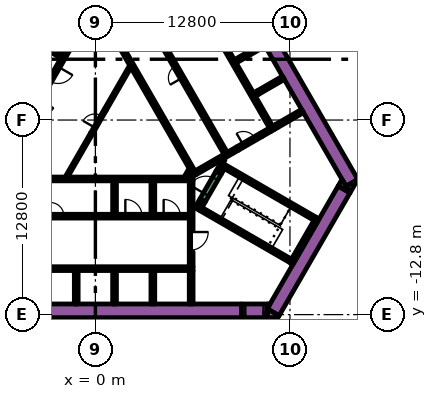
"""IFC4 building model, lengths in metres.
Left out: names, types, materials, properties, quantities, classifications, styles, units other than length and angle.
Written with IfcOpenShell. Run it as: python <this file> out.ifc"""

import sys

from ifc_helpers import new_model, si_unit, direction, frame, frame_2d, origin, place, context, subcontext, project, spatial, polyline, rectangle, outline, extrude, element, fill, save


model = new_model("IFC4")
c1 = context("Model", 3, precision=1e-05, world=origin(), true_north=direction((0.0, 1.0)))
c2 = subcontext(c1, "Body", "Model", "MODEL_VIEW")
j1 = project(units=[si_unit("LENGTHUNIT", "METRE"), si_unit("PLANEANGLEUNIT", "RADIAN")], contexts=[c1])
p1 = place(None, origin())
s1 = spatial("IfcSite", under=j1, at=p1, CompositionType="ELEMENT")
p2 = place(p1, origin())
s2 = spatial("IfcBuilding", under=s1, at=p2, CompositionType="ELEMENT")
p3 = place(p2, frame((0.0, 0.0, 11.4)))
s3 = spatial("IfcBuildingStorey", under=s2, at=p3, CompositionType="ELEMENT", Elevation=11.4)
p4 = place(p3, frame((6.776, 13.364, 0.0), z_axis=(0.0, 0.0, 1.0), x_axis=(0.500004177138, -0.8660229921, 0.0)))
e1 = element("IfcWall", 1, at=p4, inside=s3, PredefinedType="SOLIDWALL", context=c2, shape_type="SweptSolid", body=[
    extrude(rectangle(XDim=20.204, YDim=0.9, at=frame_2d((10.102, 0.0))), origin(), (0.0, 0.0, 1.0), 4.8),
])
p5 = place(p3, origin())
e2 = element("IfcWall", 2, at=p5, inside=s3, PredefinedType="SOLIDWALL", context=c2, shape_type="SweptSolid", body=[
    extrude(outline(polyline([(16.743, -4.8), (16.489, -4.36), (17.251, -3.92), (16.743, -4.8)])), origin(), (0.0, 0.0, 1.0), 4.8),
])
p6 = place(p3, frame((11.695, -12.644, 0.0), z_axis=(0.0, 0.0, 1.0), x_axis=(0.500010229568, 0.86601949766, 0.0)))
e3 = element("IfcWall", 3, at=p6, inside=s3, PredefinedType="SOLIDWALL", context=c2, shape_type="SweptSolid", body=[
    extrude(rectangle(XDim=9.326, YDim=0.9, at=frame_2d((4.663, 0.0))), origin(), (0.0, 0.0, 1.0), 4.8),
])
e4 = element("IfcWall", 4, at=p5, inside=s3, PredefinedType="SOLIDWALL", context=c2, shape_type="SweptSolid", body=[
    extrude(outline(polyline([(12.009, -13.0), (11.312, -13.0), (11.312, -12.425), (12.083, -12.871), (12.009, -13.0)])), origin(), (0.0, 0.0, 1.0), 4.8),
])
e5 = element("IfcWall", 5, at=p5, inside=s3, PredefinedType="SOLIDWALL", context=c2, shape_type="SweptSolid", body=[
    extrude(outline(polyline([(16.223, -3.9), (16.732, -4.78), (15.969, -4.34), (16.223, -3.9)])), origin(), (0.0, 0.0, 1.0), 4.8),
])
e6 = element("IfcWall", 6, at=p5, inside=s3, PredefinedType="SOLIDWALL", context=c2, shape_type="SweptSolid", body=[
    extrude(outline(polyline([(11.489, -12.1), (11.312, -12.407), (11.312, -12.1), (11.489, -12.1)])), origin(), (0.0, 0.0, 1.0), 4.8),
])
p7 = place(p3, frame((-12.019, -12.55, 0.0), z_axis=(0.0, 0.0, 1.0), x_axis=(1.0, 0.0, 0.0)))
e7 = element("IfcWall", 7, at=p7, inside=s3, PredefinedType="SOLIDWALL", context=c2, shape_type="SweptSolid", body=[
    extrude(rectangle(XDim=21.63, YDim=0.9, at=frame_2d((10.815, 0.0))), origin(), (0.0, 0.0, 1.0), 4.8),
])
p8 = place(p3, frame((12.885, -9.431, 0.0), z_axis=(0.0, 0.0, 1.0), x_axis=(0.500020560727, 0.866013532718, 0.0)))
e8 = element("IfcWall", 8, at=p8, inside=s3, PredefinedType="SOLIDWALL", context=c2, shape_type="SweptSolid", body=[
    extrude(rectangle(XDim=3.45, YDim=0.25, at=frame_2d((1.725, 0.0))), origin(), (0.0, 0.0, 1.0), 4.8),
])
p9 = place(p3, frame((12.84, -9.261, 0.0), z_axis=(0.0, 0.0, 1.0), x_axis=(-0.866013990052, 0.500019768644, 0.0)))
e9 = element("IfcWall", 9, at=p9, inside=s3, PredefinedType="SOLIDWALL", context=c2, shape_type="SweptSolid", body=[
    extrude(rectangle(XDim=6.8, YDim=0.25, at=frame_2d((3.4, 0.0))), origin(), (0.0, 0.0, 1.0), 4.8),
])
p10 = place(p3, frame((6.78, -5.906, 0.0), z_axis=(0.0, 0.0, 1.0), x_axis=(0.500223362819, 0.865896406789, 0.0)))
e10 = element("IfcWall", 10, at=p10, inside=s3, PredefinedType="SOLIDWALL", context=c2, shape_type="SweptSolid", body=[
    extrude(rectangle(XDim=0.675, YDim=0.25, at=frame_2d((0.337, 0.0))), origin(), (0.0, 0.0, 1.0), 4.8),
])
p11 = place(p3, frame((8.334, -2.964, 0.0), z_axis=(0.0, 0.0, 1.0), x_axis=(0.866016039709, -0.500016218704, 0.0)))
e11 = element("IfcWall", 11, at=p11, inside=s3, PredefinedType="SOLIDWALL", context=c2, shape_type="SweptSolid", body=[
    extrude(rectangle(XDim=7.05, YDim=0.25, at=frame_2d((3.525, 0.0))), origin(), (0.0, 0.0, 1.0), 4.8),
])
p12 = place(p3, frame((8.168, -3.503, 0.0), z_axis=(0.0, 0.0, 1.0), x_axis=(0.49972245349, 0.866185586049, 0.0)))
e12 = element("IfcWall", 12, at=p12, inside=s3, PredefinedType="SOLIDWALL", context=c2, shape_type="SweptSolid", body=[
    extrude(rectangle(XDim=0.425, YDim=0.25, at=frame_2d((0.212, 0.0))), origin(), (0.0, 0.0, 1.0), 4.8),
])
p13 = place(p3, frame((-6.425, -9.775, 0.0), z_axis=(0.0, 0.0, 1.0), x_axis=(1.0, 0.0, 0.0)))
e13 = element("IfcWall", 13, at=p13, inside=s3, PredefinedType="SOLIDWALL", context=c2, shape_type="SweptSolid", body=[
    extrude(rectangle(XDim=12.85, YDim=0.25, at=frame_2d((6.425, 0.0))), origin(), (0.0, 0.0, 1.0), 4.8),
])
p14 = place(p3, frame((-5.845, -3.875, 0.0), z_axis=(0.0, 0.0, 1.0), x_axis=(1.0, 0.0, 0.0)))
e14 = element("IfcWall", 14, at=p14, inside=s3, PredefinedType="SOLIDWALL", context=c2, shape_type="SweptSolid", body=[
    extrude(rectangle(XDim=12.27, YDim=0.25, at=frame_2d((6.135, 0.0))), origin(), (0.0, 0.0, 1.0), 4.8),
])
p15 = place(p3, frame((6.3, -7.27, 0.0), z_axis=(0.0, 0.0, 1.0), x_axis=(0.0, 1.0, 0.0)))
e15 = element("IfcWall", 15, at=p15, inside=s3, PredefinedType="SOLIDWALL", context=c2, shape_type="SweptSolid", body=[
    extrude(rectangle(XDim=3.27, YDim=0.25, at=frame_2d((1.635, 0.0))), origin(), (0.0, 0.0, 1.0), 4.8),
])
p16 = place(p3, frame((6.3, -8.672, 0.0), z_axis=(0.0, 0.0, 1.0), x_axis=(0.0, -1.0, 0.0)))
e16 = element("IfcWall", 16, at=p16, inside=s3, PredefinedType="SOLIDWALL", context=c2, shape_type="SweptSolid", body=[
    extrude(rectangle(XDim=0.978, YDim=0.25, at=frame_2d((0.489, 0.0))), origin(), (0.0, 0.0, 1.0), 4.8),
])
for number, where, z_axis, x_axis in (
    (17, (3.78, -4.0, 0.0), (0.0, 0.0, 1.0), (0.0, -1.0, 0.0)),
    (18, (1.26, -4.0, 0.0), (0.0, 0.0, 1.0), (0.0, -1.0, 0.0)),
):
    element("IfcWall", number, at=place(p3, frame(where, z_axis=z_axis, x_axis=x_axis)), inside=s3, PredefinedType="SOLIDWALL", context=c2, shape_type="SweptSolid", body=[
        extrude(rectangle(XDim=2.2, YDim=0.25, at=frame_2d((1.1, 0.0))), origin(), (0.0, 0.0, 1.0), 4.8),
    ])
for number, where, z_axis, x_axis in (
    (19, (6.3, -9.9, 0.0), (0.0, 0.0, 1.0), (0.0, -1.0, 0.0)),
    (20, (3.78, -9.9, 0.0), (0.0, 0.0, 1.0), (0.0, -1.0, 0.0)),
    (21, (1.26, -9.9, 0.0), (0.0, 0.0, 1.0), (0.0, -1.0, 0.0)),
    (22, (-1.26, -9.9, 0.0), (0.0, 0.0, 1.0), (0.0, -1.0, 0.0)),
):
    element("IfcWall", number, at=place(p3, frame(where, z_axis=z_axis, x_axis=x_axis)), inside=s3, PredefinedType="SOLIDWALL", context=c2, shape_type="SweptSolid", body=[
        extrude(rectangle(XDim=2.2, YDim=0.25, at=frame_2d((1.1, 0.0))), origin(), (0.0, 0.0, 1.0), 4.8),
    ])
p17 = place(p3, frame((11.678, -0.677, 0.0), z_axis=(0.0, 0.0, 1.0), x_axis=(-0.500003135297, 0.866023593612, 0.0)))
e23 = element("IfcWall", 23, at=p17, inside=s3, PredefinedType="SOLIDWALL", context=c2, shape_type="SweptSolid", body=[
    extrude(rectangle(XDim=12.85, YDim=0.25, at=frame_2d((6.425, 0.0))), origin(), (0.0, 0.0, 1.0), 4.8),
])
for number, where, z_axis, x_axis in (
    (24, (10.464, 1.677, 0.0), (0.0, 0.0, 1.0), (0.866, 0.5, 0.0)),
    (25, (11.894, -0.552, 0.0), (0.0, 0.0, 1.0), (-0.5, 0.866, 0.0)),
):
    element("IfcWall", number, at=place(p3, frame(where, z_axis=z_axis, x_axis=x_axis)), inside=s3, PredefinedType="SOLIDWALL", context=c2, shape_type="SweptSolid", body=[
        extrude(rectangle(XDim=0.25, YDim=0.25, at=frame_2d((0.125, 0.0))), origin(), (0.0, 0.0, 1.0), 4.8),
    ])
for number, where, z_axis, x_axis in (
    (26, (11.94, -0.381, 0.0), (0.0, 0.0, 1.0), (0.866, 0.5, 0.0)),
    (27, (12.369, 2.776, 0.0), (0.0, 0.0, 1.0), (-0.866, -0.5, 0.0)),
):
    element("IfcWall", number, at=place(p3, frame(where, z_axis=z_axis, x_axis=x_axis)), inside=s3, PredefinedType="SOLIDWALL", context=c2, shape_type="SweptSolid", body=[
        extrude(rectangle(XDim=1.95, YDim=0.25, at=frame_2d((0.975, 0.0))), origin(), (0.0, 0.0, 1.0), 4.8),
    ])
p18 = place(p3, frame((11.507, -0.631, 0.0), z_axis=(0.0, 0.0, 1.0), x_axis=(-0.866074517829, -0.49991492233, 0.0)))
e28 = element("IfcWall", 28, at=p18, inside=s3, PredefinedType="SOLIDWALL", context=c2, shape_type="SweptSolid", body=[
    extrude(rectangle(XDim=0.695, YDim=0.25, at=frame_2d((0.348, 0.0))), origin(), (0.0, 0.0, 1.0), 4.8),
])
e29 = element("IfcWall", 29, at=p5, inside=s3, PredefinedType="SOLIDWALL", context=c2, shape_type="SweptSolid", body=[
    extrude(outline(polyline([(6.552, -3.348), (6.677, -3.564), (6.46, -3.689), (4.897, -0.981), (0.332, 6.925), (0.335, 6.925), (0.335, 6.925), (0.335, 6.925), (0.335, 7.075), (0.335, 7.075), (0.335, 7.075), (0.245, 7.075), (0.079, 7.363), (0.035, 7.439), (0.252, 7.564), (0.377, 7.348), (6.552, -3.348)])), origin(), (0.0, 0.0, 1.0), 4.8),
])
p19 = place(p3, frame((6.614, -3.456, 0.0), z_axis=(0.0, 0.0, 1.0), x_axis=(0.86602447079, 0.500001615989, 0.0)))
e30 = element("IfcWall", 30, at=p19, inside=s3, PredefinedType="SOLIDWALL", context=c2, shape_type="SweptSolid", body=[
    extrude(rectangle(XDim=3.154, YDim=0.25, at=frame_2d((1.577, 0.0))), origin(), (0.0, 0.0, 1.0), 4.8),
])
p20 = place(p3, frame((9.204, 3.859, 0.0), z_axis=(0.0, 0.0, 1.0), x_axis=(0.86605622881, 0.499946605688, 0.0)))
e31 = element("IfcWall", 31, at=p20, inside=s3, PredefinedType="SOLIDWALL", context=c2, shape_type="SweptSolid", body=[
    extrude(rectangle(XDim=2.2, YDim=0.25, at=frame_2d((1.1, 0.0))), origin(), (0.0, 0.0, 1.0), 4.8),
])
p21 = place(p3, frame((-8.06, -1.311, 0.0), z_axis=(0.0, 0.0, 1.0), x_axis=(0.50000273126, 0.866023826885, 0.0)))
e32 = element("IfcWall", 32, at=p21, inside=s3, PredefinedType="SOLIDWALL", context=c2, shape_type="SweptSolid", body=[
    extrude(rectangle(XDim=10.33, YDim=0.25, at=frame_2d((5.165, 0.0))), origin(), (0.0, 0.0, 1.0), 4.8),
])
p22 = place(p3, frame((-2.204, 4.182, 0.0), z_axis=(0.0, 0.0, 1.0), x_axis=(-0.866008176907, 0.50002983664, 0.0)))
e33 = element("IfcWall", 33, at=p22, inside=s3, PredefinedType="SOLIDWALL", context=c2, shape_type="SweptSolid", body=[
    extrude(rectangle(XDim=2.2, YDim=0.25, at=frame_2d((1.1, 0.0))), origin(), (0.0, 0.0, 1.0), 4.8),
])
p23 = place(p3, frame((6.945, -5.222, 0.0), z_axis=(0.0, 0.0, 1.0), x_axis=(-0.499818422106, -0.866130212453, 0.0)))
e34 = element("IfcWall", 34, at=p23, inside=s3, PredefinedType="PARTITIONING", context=c2, shape_type="SweptSolid", body=[
    extrude(rectangle(XDim=0.514, YDim=0.15, at=frame_2d((0.257, 0.0))), origin(), (0.0, 0.0, 1.0), 3.9),
])
p24 = place(p3, frame((5.936, -3.718, 0.0), z_axis=(0.0, 0.0, 1.0), x_axis=(0.499890179513, 0.866088799389, 0.0)))
e35 = element("IfcWall", 35, at=p24, inside=s3, PredefinedType="PARTITIONING", context=c2, shape_type="SweptSolid", body=[
    extrude(rectangle(XDim=0.504, YDim=0.15, at=frame_2d((0.252, 0.0))), origin(), (0.0, 0.0, 1.0), 3.9),
])
p25 = place(p3, frame((8.459, -2.599, 0.0), z_axis=(0.0, 0.0, 1.0), x_axis=(-0.500041054325, -0.866001699761, 0.0)))
e36 = element("IfcWall", 36, at=p25, inside=s3, PredefinedType="PARTITIONING", context=c2, shape_type="SweptSolid", body=[
    extrude(rectangle(XDim=0.929, YDim=0.15, at=frame_2d((0.464, 0.0))), origin(), (0.0, 0.0, 1.0), 4.8),
])
for number, where, z_axis, x_axis in (
    (37, (-1.887, -3.718, 0.0), (0.0, 0.0, 1.0), (0.5, 0.866, 0.0)),
    (38, (0.645, 0.667, 0.0), (0.0, 0.0, 1.0), (0.5, 0.866, 0.0)),
):
    element("IfcWall", number, at=place(p3, frame(where, z_axis=z_axis, x_axis=x_axis)), inside=s3, PredefinedType="PARTITIONING", context=c2, shape_type="SweptSolid", body=[
        extrude(rectangle(XDim=3.263, YDim=0.15, at=frame_2d((1.632, 0.0))), origin(), (0.0, 0.0, 1.0), 3.9),
    ])
p26 = place(p3, frame((-6.175, -6.325, 0.0), z_axis=(0.0, 0.0, 1.0), x_axis=(1.0, 0.0, 0.0)))
e39 = element("IfcWall", 39, at=p26, inside=s3, PredefinedType="SOLIDWALL", context=c2, shape_type="SweptSolid", body=[
    extrude(rectangle(XDim=12.35, YDim=0.25, at=frame_2d((6.175, 0.0))), origin(), (0.0, 0.0, 1.0), 4.8),
])
p27 = place(p26, frame((3.205, 0.0, 0.0)))
e40 = element("IfcOpeningElement", 40, at=p27, cuts=e39, PredefinedType="OPENING", context=c2, shape_type="SweptSolid", body=[
    extrude(rectangle(XDim=0.9, YDim=2.1, at=frame_2d((0.45, 1.05))), frame((0.0, 0.135, 0.0), z_axis=(0.0, -1.0, 0.0), x_axis=(1.0, 0.0, 0.0)), (0.0, 0.0, 1.0), 0.27),
])
p28 = place(p26, frame((8.145, 0.0, 0.0)))
e41 = element("IfcOpeningElement", 41, at=p28, cuts=e39, PredefinedType="OPENING", context=c2, shape_type="SweptSolid", body=[
    extrude(rectangle(XDim=1.1, YDim=2.1, at=frame_2d((0.55, 1.05))), frame((0.0, 0.135, 0.0), z_axis=(0.0, -1.0, 0.0), x_axis=(1.0, 0.0, 0.0)), (0.0, 0.0, 1.0), 0.27),
])
p29 = place(p26, frame((10.665, 0.0, 0.0)))
e42 = element("IfcOpeningElement", 42, at=p29, cuts=e39, PredefinedType="OPENING", context=c2, shape_type="SweptSolid", body=[
    extrude(rectangle(XDim=1.1, YDim=2.1, at=frame_2d((0.55, 1.05))), frame((0.0, 0.135, 0.0), z_axis=(0.0, -1.0, 0.0), x_axis=(1.0, 0.0, 0.0)), (0.0, 0.0, 1.0), 0.27),
])
p30 = place(p3, frame((8.565, -2.185, 0.0), z_axis=(0.0, 0.0, 1.0), x_axis=(-0.499997954832, 0.866026584559, 0.0)))
e43 = element("IfcWall", 43, at=p30, inside=s3, PredefinedType="SOLIDWALL", context=c2, shape_type="SweptSolid", body=[
    extrude(rectangle(XDim=12.35, YDim=0.25, at=frame_2d((6.175, 0.0))), origin(), (0.0, 0.0, 1.0), 4.8),
])
p31 = place(p30, frame((5.725, 0.0, 0.0)))
e44 = element("IfcOpeningElement", 44, at=p31, cuts=e43, PredefinedType="OPENING", context=c2, shape_type="SweptSolid", body=[
    extrude(rectangle(XDim=0.9, YDim=2.1, at=frame_2d((0.45, 1.05))), frame((0.0, 0.135, 0.0), z_axis=(0.0, -1.0, 0.0), x_axis=(1.0, 0.0, 0.0)), (0.0, 0.0, 1.0), 0.27),
])
p32 = place(p3, frame((-0.898, 6.194, 0.0), z_axis=(0.0, 0.0, 1.0), x_axis=(-0.499996202215, -0.866027596426, 0.0)))
e45 = element("IfcWall", 45, at=p32, inside=s3, PredefinedType="SOLIDWALL", context=c2, shape_type="SweptSolid", body=[
    extrude(rectangle(XDim=9.83, YDim=0.25, at=frame_2d((4.915, 0.0))), origin(), (0.0, 0.0, 1.0), 4.8),
])
p33 = place(p32, frame((0.585, 0.0, 0.0)))
e46 = element("IfcOpeningElement", 46, at=p33, cuts=e45, PredefinedType="OPENING", context=c2, shape_type="SweptSolid", body=[
    extrude(rectangle(XDim=1.1, YDim=2.1, at=frame_2d((0.55, 1.05))), frame((0.0, 0.135, 0.0), z_axis=(0.0, -1.0, 0.0), x_axis=(1.0, 0.0, 0.0)), (0.0, 0.0, 1.0), 0.27),
])
p34 = place(p32, frame((3.105, 0.0, 0.0)))
e47 = element("IfcOpeningElement", 47, at=p34, cuts=e45, PredefinedType="OPENING", context=c2, shape_type="SweptSolid", body=[
    extrude(rectangle(XDim=1.1, YDim=2.1, at=frame_2d((0.55, 1.05))), frame((0.0, 0.135, 0.0), z_axis=(0.0, -1.0, 0.0), x_axis=(1.0, 0.0, 0.0)), (0.0, 0.0, 1.0), 0.27),
])
p35 = place(p32, frame((5.625, 0.0, 0.0)))
e48 = element("IfcOpeningElement", 48, at=p35, cuts=e45, PredefinedType="OPENING", context=c2, shape_type="SweptSolid", body=[
    extrude(rectangle(XDim=1.1, YDim=2.1, at=frame_2d((0.55, 1.05))), frame((0.0, 0.135, 0.0), z_axis=(0.0, -1.0, 0.0), x_axis=(1.0, 0.0, 0.0)), (0.0, 0.0, 1.0), 0.27),
])
p36 = place(p32, frame((8.145, 0.0, 0.0)))
e49 = element("IfcOpeningElement", 49, at=p36, cuts=e45, PredefinedType="OPENING", context=c2, shape_type="SweptSolid", body=[
    extrude(rectangle(XDim=1.1, YDim=2.1, at=frame_2d((0.55, 1.05))), frame((0.0, 0.135, 0.0), z_axis=(0.0, -1.0, 0.0), x_axis=(1.0, 0.0, 0.0)), (0.0, 0.0, 1.0), 0.27),
])
p37 = place(p3, frame((7.053, -5.284, 0.0), z_axis=(0.0, 0.0, 1.0), x_axis=(0.500078061341, 0.865980330357, 0.0)))
e50 = element("IfcWall", 50, at=p37, inside=s3, PredefinedType="SOLIDWALL", context=c2, shape_type="SweptSolid", body=[
    extrude(rectangle(XDim=2.1, YDim=0.4, at=frame_2d((1.05, 0.0))), origin(), (0.0, 0.0, 1.0), 4.8),
])
p38 = place(p37, frame((0.45, 0.0, 0.0)))
e51 = element("IfcOpeningElement", 51, at=p38, cuts=e50, PredefinedType="OPENING", context=c2, shape_type="SweptSolid", body=[
    extrude(rectangle(XDim=1.2, YDim=2.1, at=frame_2d((0.6, 1.05))), frame((0.0, 0.21, 0.0), z_axis=(0.0, -1.0, 0.0), x_axis=(1.0, 0.0, 0.0)), (0.0, 0.0, 1.0), 0.42),
])
p39 = place(p3, frame((9.346, -1.879, 0.0), z_axis=(0.0, 0.0, 1.0), x_axis=(0.866047807691, 0.499961193289, 0.0)))
e52 = element("IfcWall", 52, at=p39, inside=s3, PredefinedType="SOLIDWALL", context=c2, shape_type="SweptSolid", body=[
    extrude(rectangle(XDim=1.8, YDim=0.25, at=frame_2d((0.9, 0.0))), origin(), (0.0, 0.0, 1.0), 4.8),
])
p40 = place(p39, frame((0.45, 0.0, 0.0)))
e53 = element("IfcOpeningElement", 53, at=p40, cuts=e52, PredefinedType="OPENING", context=c2, shape_type="SweptSolid", body=[
    extrude(rectangle(XDim=0.9, YDim=2.1, at=frame_2d((0.45, 1.05))), frame((0.0, 0.135, 0.0), z_axis=(0.0, -1.0, 0.0), x_axis=(1.0, 0.0, 0.0)), (0.0, 0.0, 1.0), 0.27),
])
p41 = place(p3, frame((6.22, -7.266, 0.0), z_axis=(0.0, 0.0, 1.0), x_axis=(0.0, -1.0, 0.0)))
e54 = element("IfcWall", 54, at=p41, inside=s3, PredefinedType="PARTITIONING", context=c2, shape_type="SweptSolid", body=[
    extrude(rectangle(XDim=1.4, YDim=0.09, at=frame_2d((0.7, 0.0))), origin(), (0.0, 0.0, 1.0), 3.9),
])
p42 = place(p41, frame((0.1, 0.0, 0.0)))
e55 = element("IfcOpeningElement", 55, at=p42, cuts=e54, PredefinedType="OPENING", context=c2, shape_type="SweptSolid", body=[
    extrude(rectangle(XDim=1.2, YDim=2.1, at=frame_2d((0.6, 1.05))), frame((0.0, 0.055, 0.0), z_axis=(0.0, -1.0, 0.0), x_axis=(1.0, 0.0, 0.0)), (0.0, 0.0, 1.0), 0.11),
])
p43 = place(p3, frame((11.312, -12.55, 0.0), z_axis=(0.0, 0.0, 1.0), x_axis=(-1.0, 0.0, 0.0)))
e56 = element("IfcWall", 56, at=p43, inside=s3, PredefinedType="SOLIDWALL", context=c2, shape_type="SweptSolid", body=[
    extrude(rectangle(XDim=1.7, YDim=0.9, at=frame_2d((0.85, 0.0))), origin(), (0.0, 0.0, 1.0), 4.8),
])
p44 = place(p43, frame((0.25, 0.0, 0.0)))
e57 = element("IfcOpeningElement", 57, at=p44, cuts=e56, PredefinedType="OPENING", context=c2, shape_type="SweptSolid", body=[
    extrude(rectangle(XDim=1.2, YDim=2.1, at=frame_2d((0.6, 1.05))), frame((0.0, 0.46, 0.0), z_axis=(0.0, -1.0, 0.0), x_axis=(1.0, 0.0, 0.0)), (0.0, 0.0, 1.0), 0.92),
])
p45 = place(p3, frame((-0.255, -0.892, 0.0), z_axis=(0.0, 0.0, 1.0), x_axis=(0.500062916607, 0.865989075817, 0.0)))
e58 = element("IfcWall", 58, at=p45, inside=s3, PredefinedType="PARTITIONING", context=c2, shape_type="SweptSolid", body=[
    extrude(rectangle(XDim=1.8, YDim=0.15, at=frame_2d((0.9, 0.0))), origin(), (0.0, 0.0, 1.0), 3.9),
])
p46 = place(p45, frame((0.45, 0.0, 0.0)))
e59 = element("IfcOpeningElement", 59, at=p46, cuts=e58, PredefinedType="OPENING", context=c2, shape_type="SweptSolid", body=[
    extrude(rectangle(XDim=0.9, YDim=2.1, at=frame_2d((0.45, 1.05))), frame((0.0, 0.085, 0.0), z_axis=(0.0, -1.0, 0.0), x_axis=(1.0, 0.0, 0.0)), (0.0, 0.0, 1.0), 0.17),
])
p47 = place(p27, origin())
e60 = element("IfcDoor", 60, at=p47, inside=s3, OperationType="SINGLE_SWING_LEFT", PredefinedType="DOOR", context=c2, shape_type="SweptSolid", body=[
    extrude(rectangle(XDim=0.9, YDim=2.1, at=frame_2d((0.45, 1.05))), frame((0.0, 0.025, 0.0), z_axis=(0.0, -1.0, 0.0), x_axis=(1.0, 0.0, 0.0)), (0.0, 0.0, 1.0), 0.05),
])
fill(e40, e60)
p48 = place(p28, origin())
e61 = element("IfcDoor", 61, at=p48, inside=s3, OperationType="DOUBLE_DOOR_SLIDING", PredefinedType="DOOR", context=c2, shape_type="SweptSolid", body=[
    extrude(rectangle(XDim=1.1, YDim=2.1, at=frame_2d((0.55, 1.05))), frame((0.0, 0.025, 0.0), z_axis=(0.0, -1.0, 0.0), x_axis=(1.0, 0.0, 0.0)), (0.0, 0.0, 1.0), 0.05),
])
fill(e41, e61)
p49 = place(p29, origin())
e62 = element("IfcDoor", 62, at=p49, inside=s3, OperationType="DOUBLE_DOOR_SLIDING", PredefinedType="DOOR", context=c2, shape_type="SweptSolid", body=[
    extrude(rectangle(XDim=1.1, YDim=2.1, at=frame_2d((0.55, 1.05))), frame((0.0, 0.025, 0.0), z_axis=(0.0, -1.0, 0.0), x_axis=(1.0, 0.0, 0.0)), (0.0, 0.0, 1.0), 0.05),
])
fill(e42, e62)
p50 = place(p31, origin())
e63 = element("IfcDoor", 63, at=p50, inside=s3, OperationType="SINGLE_SWING_LEFT", PredefinedType="DOOR", context=c2, shape_type="SweptSolid", body=[
    extrude(rectangle(XDim=0.9, YDim=2.1, at=frame_2d((0.45, 1.05))), frame((0.0, 0.025, 0.0), z_axis=(0.0, -1.0, 0.0), x_axis=(1.0, 0.0, 0.0)), (0.0, 0.0, 1.0), 0.05),
])
fill(e44, e63)
p51 = place(p34, origin())
e64 = element("IfcDoor", 64, at=p51, inside=s3, OperationType="DOUBLE_DOOR_SLIDING", PredefinedType="DOOR", context=c2, shape_type="SweptSolid", body=[
    extrude(rectangle(XDim=1.1, YDim=2.1, at=frame_2d((0.55, 1.05))), frame((0.0, 0.025, 0.0), z_axis=(0.0, -1.0, 0.0), x_axis=(1.0, 0.0, 0.0)), (0.0, 0.0, 1.0), 0.05),
])
fill(e47, e64)
p52 = place(p38, origin())
e65 = element("IfcDoor", 65, at=p52, inside=s3, OperationType="SINGLE_SWING_LEFT", PredefinedType="DOOR", context=c2, shape_type="SweptSolid", body=[
    extrude(rectangle(XDim=1.2, YDim=2.1, at=frame_2d((0.6, 1.05))), frame((0.0, 0.025, 0.0), z_axis=(0.0, -1.0, 0.0), x_axis=(1.0, 0.0, 0.0)), (0.0, 0.0, 1.0), 0.05),
])
fill(e51, e65)
p53 = place(p40, origin())
e66 = element("IfcDoor", 66, at=p53, inside=s3, OperationType="SINGLE_SWING_LEFT", PredefinedType="DOOR", context=c2, shape_type="SweptSolid", body=[
    extrude(rectangle(XDim=0.9, YDim=2.1, at=frame_2d((0.45, 1.05))), frame((0.0, 0.025, 0.0), z_axis=(0.0, -1.0, 0.0), x_axis=(1.0, 0.0, 0.0)), (0.0, 0.0, 1.0), 0.05),
])
fill(e53, e66)
p54 = place(p42, origin())
e67 = element("IfcDoor", 67, at=p54, inside=s3, OperationType="SINGLE_SWING_LEFT", PredefinedType="DOOR", context=c2, shape_type="SweptSolid", body=[
    extrude(rectangle(XDim=1.2, YDim=2.1, at=frame_2d((0.6, 1.05))), frame((0.0, 0.025, 0.0), z_axis=(0.0, -1.0, 0.0), x_axis=(1.0, 0.0, 0.0)), (0.0, 0.0, 1.0), 0.05),
])
fill(e55, e67)
p55 = place(p44, origin())
e68 = element("IfcDoor", 68, at=p55, inside=s3, OperationType="SINGLE_SWING_LEFT", PredefinedType="DOOR", context=c2, shape_type="SweptSolid", body=[
    extrude(rectangle(XDim=1.2, YDim=2.1, at=frame_2d((0.6, 1.05))), frame((0.0, 0.025, 0.0), z_axis=(0.0, -1.0, 0.0), x_axis=(1.0, 0.0, 0.0)), (0.0, 0.0, 1.0), 0.05),
])
fill(e57, e68)
p56 = place(p46, origin())
e69 = element("IfcDoor", 69, at=p56, inside=s3, OperationType="SINGLE_SWING_LEFT", PredefinedType="DOOR", context=c2, shape_type="SweptSolid", body=[
    extrude(rectangle(XDim=0.9, YDim=2.1, at=frame_2d((0.45, 1.05))), frame((0.0, 0.025, 0.0), z_axis=(0.0, -1.0, 0.0), x_axis=(1.0, 0.0, 0.0)), (0.0, 0.0, 1.0), 0.05),
])
fill(e59, e69)
save(model, sys.argv[1])
